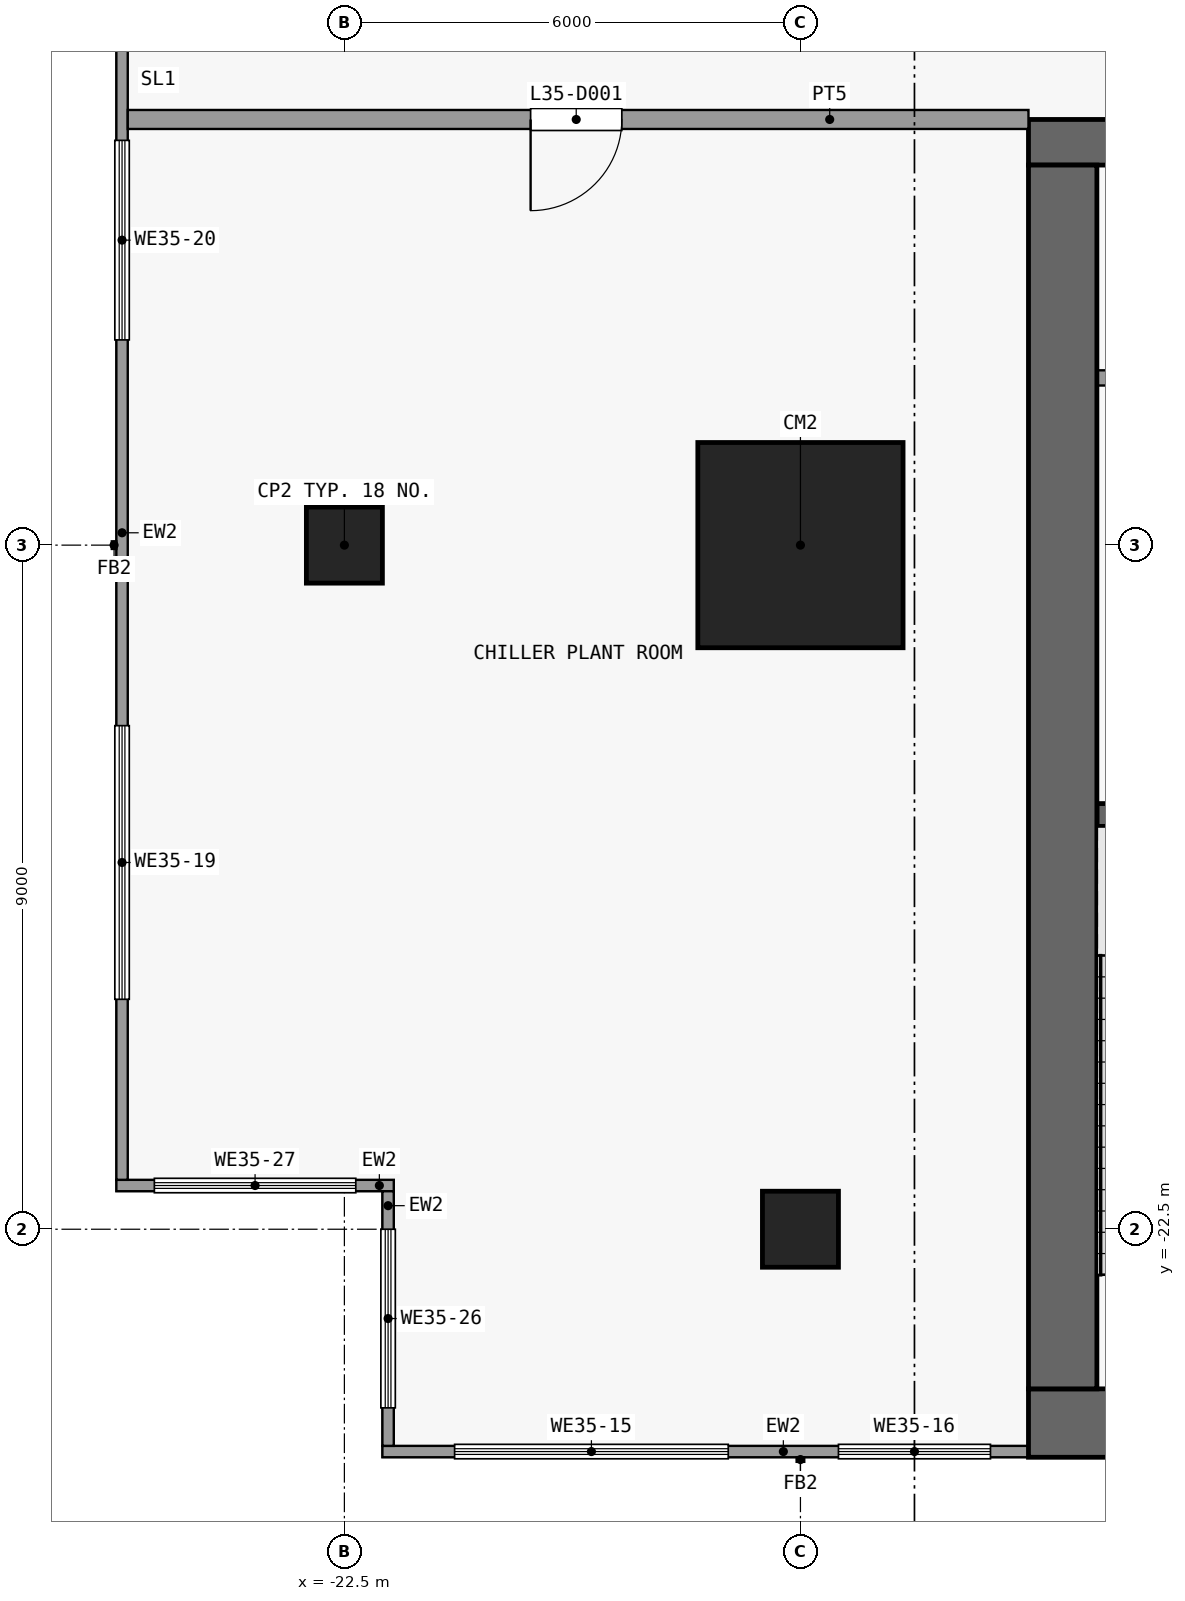
"""IFC4 building model, lengths in metres.
Left out: names, types, materials, properties, quantities, classifications, styles, units other than length and angle.
Written with IfcOpenShell. Run it as: python <this file> out.ifc"""

import sys

from ifc_helpers import new_model, si_unit, direction, frame, frame_2d, origin, origin_2d, place, context, subcontext, project, spatial, rectangle, extrude, element, fill, save


model = new_model("IFC4")
c1 = context("Model", 3, precision=1e-05, world=origin(), true_north=direction((0.0, 1.0)))
c2 = subcontext(c1, "Body", "Model", "MODEL_VIEW")
j1 = project(units=[si_unit("LENGTHUNIT", "METRE"), si_unit("PLANEANGLEUNIT", "RADIAN")], contexts=[c1])
p1 = place(None, origin())
s1 = spatial("IfcSite", under=j1, at=p1, CompositionType="ELEMENT")
p2 = place(p1, origin())
s2 = spatial("IfcBuilding", under=s1, at=p2, CompositionType="ELEMENT")
p3 = place(p2, frame((0.0, 0.0, 143.9)))
s3 = spatial("IfcBuildingStorey", under=s2, at=p3, CompositionType="ELEMENT", Elevation=143.9)
for number, where, z_axis, x_axis in (
    (1, (-22.5, -13.5, 0.0), (0.0, 0.0, 1.0), (1.0, 0.0, 0.0)),
    (2, (-16.5, -22.5, 0.0), (0.0, 0.0, 1.0), (1.0, 0.0, 0.0)),
):
    element("IfcColumn", number, at=place(p3, frame(where, z_axis=z_axis, x_axis=x_axis)), inside=s3, PredefinedType="COLUMN", context=c2, shape_type="SweptSolid", body=[
        extrude(rectangle(XDim=1.0, YDim=1.0, at=origin_2d()), origin(), (0.0, 0.0, 1.0), 5.4),
    ])
p4 = place(p3, frame((-16.5, -13.5, 0.0), z_axis=(0.0, 0.0, 1.0), x_axis=(1.0, 0.0, 0.0)))
e3 = element("IfcColumn", 3, at=p4, inside=s3, PredefinedType="COLUMN", context=c2, shape_type="SweptSolid", body=[
    extrude(rectangle(XDim=2.7, YDim=2.7, at=origin_2d()), origin(), (0.0, 0.0, 1.0), 5.4),
])
p5 = place(p3, frame((-13.5, -25.05, 0.0), z_axis=(0.0, 0.0, 1.0), x_axis=(1.0, 0.0, 0.0)))
e4 = element("IfcWall", 4, at=p5, inside=s3, PredefinedType="SHEAR", context=c2, shape_type="SweptSolid", body=[
    extrude(rectangle(XDim=27.0, YDim=0.9, at=frame_2d((13.5, 0.0))), origin(), (0.0, 0.0, 1.0), 5.0),
])
p6 = place(p3, frame((-13.5, -8.2, 0.0), z_axis=(0.0, 0.0, 1.0), x_axis=(1.0, 0.0, 0.0)))
e5 = element("IfcWall", 5, at=p6, inside=s3, PredefinedType="SHEAR", context=c2, shape_type="SweptSolid", body=[
    extrude(rectangle(XDim=27.0, YDim=0.6, at=frame_2d((13.5, 0.0))), origin(), (0.0, 0.0, 1.0), 5.0),
])
p7 = place(p6, frame((7.8, 0.0, 0.0)))
e6 = element("IfcOpeningElement", 6, at=p7, cuts=e5, PredefinedType="OPENING", context=c2, shape_type="SweptSolid", body=[
    extrude(rectangle(XDim=1.8, YDim=2.1, at=frame_2d((0.9, 1.05))), frame((0.0, 0.31, 0.0), z_axis=(0.0, -1.0, 0.0), x_axis=(1.0, 0.0, 0.0)), (0.0, 0.0, 1.0), 0.62),
])
p8 = place(p6, frame((17.4, 0.0, 0.0)))
e7 = element("IfcOpeningElement", 7, at=p8, cuts=e5, PredefinedType="OPENING", context=c2, shape_type="SweptSolid", body=[
    extrude(rectangle(XDim=1.8, YDim=2.1, at=frame_2d((0.9, 1.05))), frame((0.0, 0.31, 0.0), z_axis=(0.0, -1.0, 0.0), x_axis=(1.0, 0.0, 0.0)), (0.0, 0.0, 1.0), 0.62),
])
p9 = place(p6, frame((2.725, 0.0, 0.0)))
e8 = element("IfcOpeningElement", 8, at=p9, cuts=e5, PredefinedType="OPENING", context=c2, shape_type="SweptSolid", body=[
    extrude(rectangle(XDim=0.9, YDim=2.1, at=frame_2d((0.45, 1.05))), frame((0.0, 0.31, 0.0), z_axis=(0.0, -1.0, 0.0), x_axis=(1.0, 0.0, 0.0)), (0.0, 0.0, 1.0), 0.62),
])
p10 = place(p6, frame((23.375, 0.0, 0.0)))
e9 = element("IfcOpeningElement", 9, at=p10, cuts=e5, PredefinedType="OPENING", context=c2, shape_type="SweptSolid", body=[
    extrude(rectangle(XDim=0.9, YDim=2.1, at=frame_2d((0.45, 1.05))), frame((0.0, 0.31, 0.0), z_axis=(0.0, -1.0, 0.0), x_axis=(1.0, 0.0, 0.0)), (0.0, 0.0, 1.0), 0.62),
])
p11 = place(p3, frame((-13.05, -24.6, 0.0), z_axis=(0.0, 0.0, 1.0), x_axis=(0.0, 1.0, 0.0)))
e10 = element("IfcWall", 10, at=p11, inside=s3, PredefinedType="SHEAR", context=c2, shape_type="SweptSolid", body=[
    extrude(rectangle(XDim=16.1, YDim=0.9, at=frame_2d((8.05, 0.0))), origin(), (0.0, 0.0, 1.0), 5.0),
])
p12 = place(p3, frame((-12.6, -17.05, 0.0), z_axis=(0.0, 0.0, 1.0), x_axis=(1.0, 0.0, 0.0)))
e11 = element("IfcWall", 11, at=p12, inside=s3, PredefinedType="SHEAR", context=c2, shape_type="SweptSolid", body=[
    extrude(rectangle(XDim=3.1, YDim=0.3, at=frame_2d((1.55, 0.0))), origin(), (0.0, 0.0, 1.0), 5.0),
])
p13 = place(p3, frame((-12.6, -11.3, 0.0), z_axis=(0.0, 0.0, 1.0), x_axis=(1.0, 0.0, 0.0)))
e12 = element("IfcWall", 12, at=p13, inside=s3, PredefinedType="PARTITIONING", context=c2, shape_type="SweptSolid", body=[
    extrude(rectangle(XDim=1.45, YDim=0.2, at=frame_2d((0.725, 0.0))), origin(), (0.0, 0.0, 1.0), 5.0),
])
p14 = place(p3, frame((-13.5, -25.425, 0.0), z_axis=(0.0, 0.0, 1.0), x_axis=(-1.0, 0.0, 0.0)))
e13 = element("IfcWall", 13, at=p14, inside=s3, PredefinedType="SOLIDWALL", context=c2, shape_type="SweptSolid", body=[
    extrude(rectangle(XDim=8.5, YDim=0.15, at=frame_2d((4.25, 0.0))), origin(), (0.0, 0.0, 1.0), 5.0),
])
p15 = place(p14, frame((3.95, 0.0, 1.2)))
e14 = element("IfcOpeningElement", 14, at=p15, cuts=e13, PredefinedType="OPENING", context=c2, shape_type="SweptSolid", body=[
    extrude(rectangle(XDim=3.6, YDim=3.0, at=frame_2d((1.8, 1.5))), frame((0.0, 0.085, 0.0), z_axis=(0.0, -1.0, 0.0), x_axis=(1.0, 0.0, 0.0)), (0.0, 0.0, 1.0), 0.17),
])
p16 = place(p14, frame((0.5, 0.0, 1.2)))
e15 = element("IfcOpeningElement", 15, at=p16, cuts=e13, PredefinedType="OPENING", context=c2, shape_type="SweptSolid", body=[
    extrude(rectangle(XDim=2.0, YDim=3.0, at=frame_2d((1.0, 1.5))), frame((0.0, 0.085, 0.0), z_axis=(0.0, -1.0, 0.0), x_axis=(1.0, 0.0, 0.0)), (0.0, 0.0, 1.0), 0.17),
])
p17 = place(p3, frame((-25.425, -21.85, 0.0), z_axis=(0.0, 0.0, 1.0), x_axis=(0.0, 1.0, 0.0)))
e16 = element("IfcWall", 16, at=p17, inside=s3, PredefinedType="SOLIDWALL", context=c2, shape_type="SweptSolid", body=[
    extrude(rectangle(XDim=40.7, YDim=0.15, at=frame_2d((20.35, 0.0))), origin(), (0.0, 0.0, 1.0), 5.0),
])
p18 = place(p17, frame((2.375, 0.0, 1.2)))
e17 = element("IfcOpeningElement", 17, at=p18, cuts=e16, PredefinedType="OPENING", context=c2, shape_type="SweptSolid", body=[
    extrude(rectangle(XDim=3.6, YDim=3.0, at=frame_2d((1.8, 1.5))), frame((0.0, 0.085, 0.0), z_axis=(0.0, -1.0, 0.0), x_axis=(1.0, 0.0, 0.0)), (0.0, 0.0, 1.0), 0.17),
])
p19 = place(p17, frame((11.05, 0.0, 1.2)))
e18 = element("IfcOpeningElement", 18, at=p19, cuts=e16, PredefinedType="OPENING", context=c2, shape_type="SweptSolid", body=[
    extrude(rectangle(XDim=2.625, YDim=3.0, at=frame_2d((1.312, 1.5))), frame((0.0, 0.085, 0.0), z_axis=(0.0, -1.0, 0.0), x_axis=(1.0, 0.0, 0.0)), (0.0, 0.0, 1.0), 0.17),
])
p20 = place(p17, frame((18.55, 0.0, 1.2)))
e19 = element("IfcOpeningElement", 19, at=p20, cuts=e16, PredefinedType="OPENING", context=c2, shape_type="SweptSolid", body=[
    extrude(rectangle(XDim=3.6, YDim=3.0, at=frame_2d((1.8, 1.5))), frame((0.0, 0.085, 0.0), z_axis=(0.0, -1.0, 0.0), x_axis=(1.0, 0.0, 0.0)), (0.0, 0.0, 1.0), 0.17),
])
p21 = place(p17, frame((24.55, 0.0, 1.2)))
e20 = element("IfcOpeningElement", 20, at=p21, cuts=e16, PredefinedType="OPENING", context=c2, shape_type="SweptSolid", body=[
    extrude(rectangle(XDim=3.6, YDim=3.0, at=frame_2d((1.8, 1.5))), frame((0.0, 0.085, 0.0), z_axis=(0.0, -1.0, 0.0), x_axis=(1.0, 0.0, 0.0)), (0.0, 0.0, 1.0), 0.17),
])
p22 = place(p17, frame((30.55, 0.0, 1.2)))
e21 = element("IfcOpeningElement", 21, at=p22, cuts=e16, PredefinedType="OPENING", context=c2, shape_type="SweptSolid", body=[
    extrude(rectangle(XDim=1.525, YDim=3.0, at=frame_2d((0.762, 1.5))), frame((0.0, 0.085, 0.0), z_axis=(0.0, -1.0, 0.0), x_axis=(1.0, 0.0, 0.0)), (0.0, 0.0, 1.0), 0.17),
])
p23 = place(p17, frame((32.625, 0.0, 1.2)))
e22 = element("IfcOpeningElement", 22, at=p23, cuts=e16, PredefinedType="OPENING", context=c2, shape_type="SweptSolid", body=[
    extrude(rectangle(XDim=1.525, YDim=3.0, at=frame_2d((0.762, 1.5))), frame((0.0, 0.085, 0.0), z_axis=(0.0, -1.0, 0.0), x_axis=(1.0, 0.0, 0.0)), (0.0, 0.0, 1.0), 0.17),
])
p24 = place(p17, frame((36.225, 0.0, 1.2)))
e23 = element("IfcOpeningElement", 23, at=p24, cuts=e16, PredefinedType="OPENING", context=c2, shape_type="SweptSolid", body=[
    extrude(rectangle(XDim=3.6, YDim=3.0, at=frame_2d((1.8, 1.5))), frame((0.0, 0.085, 0.0), z_axis=(0.0, -1.0, 0.0), x_axis=(1.0, 0.0, 0.0)), (0.0, 0.0, 1.0), 0.17),
])
p25 = place(p3, frame((-21.925, -25.35, 0.0), z_axis=(0.0, 0.0, 1.0), x_axis=(0.0, 1.0, 0.0)))
e24 = element("IfcWall", 24, at=p25, inside=s3, PredefinedType="SOLIDWALL", context=c2, shape_type="SweptSolid", body=[
    extrude(rectangle(XDim=3.35, YDim=0.15, at=frame_2d((1.675, 0.0))), origin(), (0.0, 0.0, 1.0), 5.0),
])
p26 = place(p25, frame((0.5, 0.0, 1.2)))
e25 = element("IfcOpeningElement", 25, at=p26, cuts=e24, PredefinedType="OPENING", context=c2, shape_type="SweptSolid", body=[
    extrude(rectangle(XDim=2.35, YDim=3.0, at=frame_2d((1.175, 1.5))), frame((0.0, 0.085, 0.0), z_axis=(0.0, -1.0, 0.0), x_axis=(1.0, 0.0, 0.0)), (0.0, 0.0, 1.0), 0.17),
])
p27 = place(p3, frame((-21.85, -21.925, 0.0), z_axis=(0.0, 0.0, 1.0), x_axis=(-1.0, 0.0, 0.0)))
e26 = element("IfcWall", 26, at=p27, inside=s3, PredefinedType="SOLIDWALL", context=c2, shape_type="SweptSolid", body=[
    extrude(rectangle(XDim=3.65, YDim=0.15, at=frame_2d((1.825, 0.0))), origin(), (0.0, 0.0, 1.0), 5.0),
])
p28 = place(p27, frame((0.5, 0.0, 1.2)))
e27 = element("IfcOpeningElement", 27, at=p28, cuts=e26, PredefinedType="OPENING", context=c2, shape_type="SweptSolid", body=[
    extrude(rectangle(XDim=2.65, YDim=3.0, at=frame_2d((1.325, 1.5))), frame((0.0, 0.085, 0.0), z_axis=(0.0, -1.0, 0.0), x_axis=(1.0, 0.0, 0.0)), (0.0, 0.0, 1.0), 0.17),
])
p29 = place(p3, frame((-25.35, -7.9, 0.0), z_axis=(0.0, 0.0, 1.0), x_axis=(1.0, 0.0, 0.0)))
e28 = element("IfcWall", 28, at=p29, inside=s3, PredefinedType="PARTITIONING", context=c2, shape_type="SweptSolid", body=[
    extrude(rectangle(XDim=11.85, YDim=0.25, at=frame_2d((5.925, 0.0))), origin(), (0.0, 0.0, 1.0), 5.0),
])
p30 = place(p29, frame((5.3, 0.0, 0.0)))
e29 = element("IfcOpeningElement", 29, at=p30, cuts=e28, PredefinedType="OPENING", context=c2, shape_type="SweptSolid", body=[
    extrude(rectangle(XDim=1.2, YDim=2.1, at=frame_2d((0.6, 1.05))), frame((0.0, 0.135, 0.0), z_axis=(0.0, -1.0, 0.0), x_axis=(1.0, 0.0, 0.0)), (0.0, 0.0, 1.0), 0.27),
])
p31 = place(p15, origin())
e30 = element("IfcWindow", 30, at=p31, inside=s3, PartitioningType="SINGLE_PANEL", PredefinedType="WINDOW", context=c2, shape_type="SweptSolid", body=[
    extrude(rectangle(XDim=3.6, YDim=3.0, at=frame_2d((1.8, 1.5))), frame((0.0, 0.03, 0.0), z_axis=(0.0, -1.0, 0.0), x_axis=(1.0, 0.0, 0.0)), (0.0, 0.0, 1.0), 0.06),
])
fill(e14, e30)
p32 = place(p16, origin())
e31 = element("IfcWindow", 31, at=p32, inside=s3, PartitioningType="SINGLE_PANEL", PredefinedType="WINDOW", context=c2, shape_type="SweptSolid", body=[
    extrude(rectangle(XDim=2.0, YDim=3.0, at=frame_2d((1.0, 1.5))), frame((0.0, 0.03, 0.0), z_axis=(0.0, -1.0, 0.0), x_axis=(1.0, 0.0, 0.0)), (0.0, 0.0, 1.0), 0.06),
])
fill(e15, e31)
p33 = place(p18, origin())
e32 = element("IfcWindow", 32, at=p33, inside=s3, PartitioningType="SINGLE_PANEL", PredefinedType="WINDOW", context=c2, shape_type="SweptSolid", body=[
    extrude(rectangle(XDim=3.6, YDim=3.0, at=frame_2d((1.8, 1.5))), frame((0.0, 0.03, 0.0), z_axis=(0.0, -1.0, 0.0), x_axis=(1.0, 0.0, 0.0)), (0.0, 0.0, 1.0), 0.06),
])
fill(e17, e32)
p34 = place(p19, origin())
e33 = element("IfcWindow", 33, at=p34, inside=s3, PartitioningType="SINGLE_PANEL", PredefinedType="WINDOW", context=c2, shape_type="SweptSolid", body=[
    extrude(rectangle(XDim=2.625, YDim=3.0, at=frame_2d((1.312, 1.5))), frame((0.0, 0.03, 0.0), z_axis=(0.0, -1.0, 0.0), x_axis=(1.0, 0.0, 0.0)), (0.0, 0.0, 1.0), 0.06),
])
fill(e18, e33)
p35 = place(p26, origin())
e34 = element("IfcWindow", 34, at=p35, inside=s3, PartitioningType="SINGLE_PANEL", PredefinedType="WINDOW", context=c2, shape_type="SweptSolid", body=[
    extrude(rectangle(XDim=2.35, YDim=3.0, at=frame_2d((1.175, 1.5))), frame((0.0, 0.03, 0.0), z_axis=(0.0, -1.0, 0.0), x_axis=(1.0, 0.0, 0.0)), (0.0, 0.0, 1.0), 0.06),
])
fill(e25, e34)
p36 = place(p28, origin())
e35 = element("IfcWindow", 35, at=p36, inside=s3, PartitioningType="SINGLE_PANEL", PredefinedType="WINDOW", context=c2, shape_type="SweptSolid", body=[
    extrude(rectangle(XDim=2.65, YDim=3.0, at=frame_2d((1.325, 1.5))), frame((0.0, 0.03, 0.0), z_axis=(0.0, -1.0, 0.0), x_axis=(1.0, 0.0, 0.0)), (0.0, 0.0, 1.0), 0.06),
])
fill(e27, e35)
p37 = place(p30, origin())
e36 = element("IfcDoor", 36, at=p37, inside=s3, OperationType="SINGLE_SWING_LEFT", PredefinedType="DOOR", context=c2, shape_type="SweptSolid", body=[
    extrude(rectangle(XDim=1.2, YDim=2.1, at=frame_2d((0.6, 1.05))), frame((0.0, 0.025, 0.0), z_axis=(0.0, -1.0, 0.0), x_axis=(1.0, 0.0, 0.0)), (0.0, 0.0, 1.0), 0.05),
])
fill(e29, e36)
save(model, sys.argv[1])
